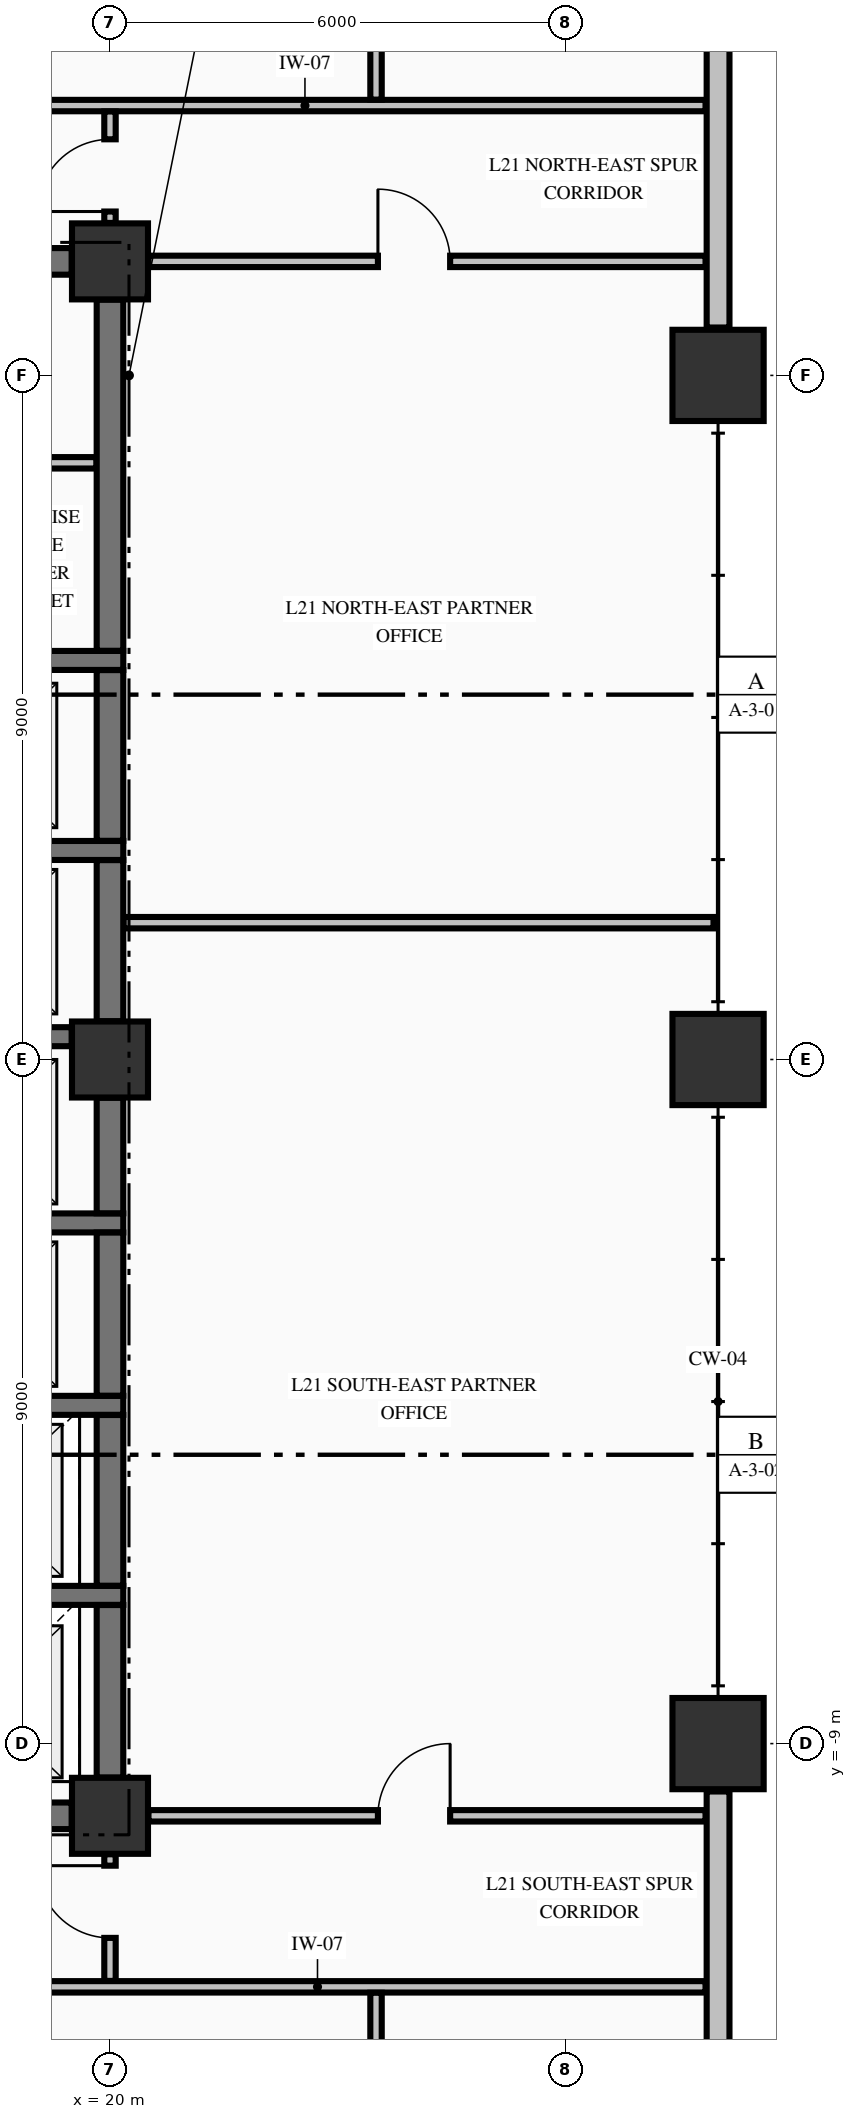
"""IFC4 building model, lengths in metres.
Left out: names, types, materials, properties, quantities, classifications, styles, units other than length and angle.
Written with IfcOpenShell. Run it as: python <this file> out.ifc"""

import sys

from ifc_helpers import new_model, si_unit, direction, frame, frame_2d, origin, origin_2d, place, context, subcontext, project, spatial, rectangle, extrude, element, fill, save


model = new_model("IFC4")
c1 = context("Model", 3, precision=1e-05, world=origin(), true_north=direction((0.0, 1.0)))
c2 = subcontext(c1, "Body", "Model", "MODEL_VIEW")
j1 = project(units=[si_unit("LENGTHUNIT", "METRE"), si_unit("PLANEANGLEUNIT", "RADIAN")], contexts=[c1])
p1 = place(None, origin())
s1 = spatial("IfcSite", under=j1, at=p1, CompositionType="ELEMENT")
p2 = place(p1, origin())
s2 = spatial("IfcBuilding", under=s1, at=p2, CompositionType="ELEMENT")
p3 = place(p2, frame((0.0, 0.0, 86.94)))
s3 = spatial("IfcBuildingStorey", under=s2, at=p3, CompositionType="ELEMENT", Elevation=86.94)
for number, where, z_axis, x_axis in (
    (1, (28.0, -9.0, -0.425), (0.0, 0.0, 1.0), (1.0, 0.0, 0.0)),
    (2, (28.0, 0.0, -0.425), (0.0, 0.0, 1.0), (1.0, 0.0, 0.0)),
    (3, (28.0, 9.0, -0.425), (0.0, 0.0, 1.0), (1.0, 0.0, 0.0)),
):
    element("IfcColumn", number, at=place(p3, frame(where, z_axis=z_axis, x_axis=x_axis)), inside=s3, PredefinedType="COLUMN", context=c2, shape_type="SweptSolid", body=[
        extrude(rectangle(XDim=1.2, YDim=1.2, at=origin_2d()), origin(), (0.0, 0.0, 1.0), 4.595),
    ])
for number, where, z_axis, x_axis in (
    (4, (20.0, -9.95, -0.425), (0.0, 0.0, 1.0), (1.0, 0.0, 0.0)),
    (5, (20.0, 10.5, -0.425), (0.0, 0.0, 1.0), (1.0, 0.0, 0.0)),
    (6, (20.0, 0.0, -0.425), (0.0, 0.0, 1.0), (1.0, 0.0, 0.0)),
):
    element("IfcColumn", number, at=place(p3, frame(where, z_axis=z_axis, x_axis=x_axis)), inside=s3, PredefinedType="COLUMN", context=c2, shape_type="SweptSolid", body=[
        extrude(rectangle(XDim=1.0, YDim=1.0, at=origin_2d()), origin(), (0.0, 0.0, 1.0), 4.595),
    ])
for number, where, z_axis, x_axis in (
    (7, (28.0, -20.37, 0.0), (0.0, 0.0, 1.0), (0.0, 1.0, 0.0)),
    (8, (28.0, 9.63, 0.0), (0.0, 0.0, 1.0), (0.0, 1.0, 0.0)),
):
    element("IfcWall", number, at=place(p3, frame(where, z_axis=z_axis, x_axis=x_axis)), inside=s3, PredefinedType="STANDARD", context=c2, shape_type="SweptSolid", body=[
        extrude(rectangle(XDim=10.74, YDim=0.3, at=frame_2d((5.37, 0.0))), origin(), (0.0, 0.0, 1.0), 1.962),
    ])
p4 = place(p3, frame((14.7, -9.95, 0.0), z_axis=(0.0, 0.0, 1.0), x_axis=(1.0, 0.0, 0.0)))
e9 = element("IfcWall", 9, at=p4, inside=s3, PredefinedType="SHEAR", context=c2, shape_type="SweptSolid", body=[
    extrude(rectangle(XDim=4.796, YDim=0.35, at=frame_2d((2.398, 0.0))), origin(), (0.0, 0.0, 1.0), 4.17),
])
p5 = place(p4, frame((0.65, 0.0, 0.0)))
e10 = element("IfcOpeningElement", 10, at=p5, cuts=e9, PredefinedType="OPENING", context=c2, shape_type="SweptSolid", body=[
    extrude(rectangle(XDim=1.2, YDim=2.15, at=frame_2d((0.6, 1.075))), frame((0.0, 0.185, 0.0), z_axis=(0.0, -1.0, 0.0), x_axis=(1.0, 0.0, 0.0)), (0.0, 0.0, 1.0), 0.37),
])
for number, where, z_axis, x_axis in (
    (11, (17.025, -7.05, 0.0), (0.0, 0.0, 1.0), (1.0, 0.0, 0.0)),
    (12, (17.025, -4.55, 0.0), (0.0, 0.0, 1.0), (1.0, 0.0, 0.0)),
    (13, (17.025, -2.15, 0.0), (0.0, 0.0, 1.0), (1.0, 0.0, 0.0)),
):
    element("IfcWall", number, at=place(p3, frame(where, z_axis=z_axis, x_axis=x_axis)), inside=s3, PredefinedType="SOLIDWALL", context=c2, shape_type="SweptSolid", body=[
        extrude(rectangle(XDim=3.15, YDim=0.25, at=frame_2d((1.575, 0.0))), origin(), (0.0, 0.0, 1.0), 4.17),
    ])
p6 = place(p3, frame((17.025, 0.3, 0.0), z_axis=(0.0, 0.0, 1.0), x_axis=(1.0, 0.0, 0.0)))
e14 = element("IfcWall", 14, at=p6, inside=s3, PredefinedType="SOLIDWALL", context=c2, shape_type="SweptSolid", body=[
    extrude(rectangle(XDim=2.471, YDim=0.25, at=frame_2d((1.236, 0.0))), origin(), (0.0, 0.0, 1.0), 4.17),
])
for number, where, z_axis, x_axis in (
    (15, (17.025, 2.75, 0.0), (0.0, 0.0, 1.0), (1.0, 0.0, 0.0)),
    (16, (17.025, 5.25, 0.0), (0.0, 0.0, 1.0), (1.0, 0.0, 0.0)),
):
    element("IfcWall", number, at=place(p3, frame(where, z_axis=z_axis, x_axis=x_axis)), inside=s3, PredefinedType="SOLIDWALL", context=c2, shape_type="SweptSolid", body=[
        extrude(rectangle(XDim=3.15, YDim=0.25, at=frame_2d((1.575, 0.0))), origin(), (0.0, 0.0, 1.0), 4.17),
    ])
p7 = place(p3, frame((14.7, 10.5, 0.0), z_axis=(0.0, 0.0, 1.0), x_axis=(1.0, 0.0, 0.0)))
e17 = element("IfcWall", 17, at=p7, inside=s3, PredefinedType="SHEAR", context=c2, shape_type="SweptSolid", body=[
    extrude(rectangle(XDim=4.796, YDim=0.35, at=frame_2d((2.398, 0.0))), origin(), (0.0, 0.0, 1.0), 4.17),
])
p8 = place(p7, frame((0.65, 0.0, 0.0)))
e18 = element("IfcOpeningElement", 18, at=p8, cuts=e17, PredefinedType="OPENING", context=c2, shape_type="SweptSolid", body=[
    extrude(rectangle(XDim=1.2, YDim=2.15, at=frame_2d((0.6, 1.075))), frame((0.0, 0.185, 0.0), z_axis=(0.0, -1.0, 0.0), x_axis=(1.0, 0.0, 0.0)), (0.0, 0.0, 1.0), 0.37),
])
p9 = place(p7, frame((3.225, 0.0, 0.0)))
e19 = element("IfcOpeningElement", 19, at=p9, cuts=e17, PredefinedType="OPENING", context=c2, shape_type="SweptSolid", body=[
    extrude(rectangle(XDim=0.95, YDim=2.15, at=frame_2d((0.475, 1.075))), frame((0.0, 0.185, 0.0), z_axis=(0.0, -1.0, 0.0), x_axis=(1.0, 0.0, 0.0)), (0.0, 0.0, 1.0), 0.37),
])
p10 = place(p3, frame((-22.835, -12.2, 0.0), z_axis=(0.0, 0.0, 1.0), x_axis=(1.0, 0.0, 0.0)))
e20 = element("IfcWall", 20, at=p10, inside=s3, PredefinedType="PARTITIONING", context=c2, shape_type="SweptSolid", body=[
    extrude(rectangle(XDim=50.67, YDim=0.15, at=frame_2d((25.335, 0.0))), origin(), (0.0, 0.0, 1.0), 4.17),
])
p11 = place(p10, frame((9.26, 0.0, 0.0)))
e21 = element("IfcOpeningElement", 21, at=p11, cuts=e20, PredefinedType="OPENING", context=c2, shape_type="SweptSolid", body=[
    extrude(rectangle(XDim=1.05, YDim=2.15, at=frame_2d((0.525, 1.075))), frame((0.0, 0.085, 0.0), z_axis=(0.0, -1.0, 0.0), x_axis=(1.0, 0.0, 0.0)), (0.0, 0.0, 1.0), 0.17),
])
p12 = place(p10, frame((19.31, 0.0, 0.0)))
e22 = element("IfcOpeningElement", 22, at=p12, cuts=e20, PredefinedType="OPENING", context=c2, shape_type="SweptSolid", body=[
    extrude(rectangle(XDim=1.05, YDim=2.15, at=frame_2d((0.525, 1.075))), frame((0.0, 0.085, 0.0), z_axis=(0.0, -1.0, 0.0), x_axis=(1.0, 0.0, 0.0)), (0.0, 0.0, 1.0), 0.17),
])
p13 = place(p10, frame((27.36, 0.0, 0.0)))
e23 = element("IfcOpeningElement", 23, at=p13, cuts=e20, PredefinedType="OPENING", context=c2, shape_type="SweptSolid", body=[
    extrude(rectangle(XDim=0.95, YDim=2.15, at=frame_2d((0.475, 1.075))), frame((0.0, 0.085, 0.0), z_axis=(0.0, -1.0, 0.0), x_axis=(1.0, 0.0, 0.0)), (0.0, 0.0, 1.0), 0.17),
])
p14 = place(p10, frame((32.41, 0.0, 0.0)))
e24 = element("IfcOpeningElement", 24, at=p14, cuts=e20, PredefinedType="OPENING", context=c2, shape_type="SweptSolid", body=[
    extrude(rectangle(XDim=0.95, YDim=2.15, at=frame_2d((0.475, 1.075))), frame((0.0, 0.085, 0.0), z_axis=(0.0, -1.0, 0.0), x_axis=(1.0, 0.0, 0.0)), (0.0, 0.0, 1.0), 0.17),
])
p15 = place(p10, frame((39.41, 0.0, 0.0)))
e25 = element("IfcOpeningElement", 25, at=p15, cuts=e20, PredefinedType="OPENING", context=c2, shape_type="SweptSolid", body=[
    extrude(rectangle(XDim=1.05, YDim=2.15, at=frame_2d((0.525, 1.075))), frame((0.0, 0.085, 0.0), z_axis=(0.0, -1.0, 0.0), x_axis=(1.0, 0.0, 0.0)), (0.0, 0.0, 1.0), 0.17),
])
p16 = place(p3, frame((20.506, -9.95, 0.0), z_axis=(0.0, 0.0, 1.0), x_axis=(1.0, 0.0, 0.0)))
e26 = element("IfcWall", 26, at=p16, inside=s3, PredefinedType="PARTITIONING", context=c2, shape_type="SweptSolid", body=[
    extrude(rectangle(XDim=7.329, YDim=0.15, at=frame_2d((3.665, 0.0))), origin(), (0.0, 0.0, 1.0), 4.17),
])
p17 = place(p16, frame((3.019, 0.0, 0.0)))
e27 = element("IfcOpeningElement", 27, at=p17, cuts=e26, PredefinedType="OPENING", context=c2, shape_type="SweptSolid", body=[
    extrude(rectangle(XDim=0.95, YDim=2.15, at=frame_2d((0.475, 1.075))), frame((0.0, 0.085, 0.0), z_axis=(0.0, -1.0, 0.0), x_axis=(1.0, 0.0, 0.0)), (0.0, 0.0, 1.0), 0.17),
])
p18 = place(p3, frame((20.178, 1.8, 0.0), z_axis=(0.0, 0.0, 1.0), x_axis=(1.0, 0.0, 0.0)))
e28 = element("IfcWall", 28, at=p18, inside=s3, PredefinedType="PARTITIONING", context=c2, shape_type="SweptSolid", body=[
    extrude(rectangle(XDim=7.762, YDim=0.15, at=frame_2d((3.881, 0.0))), origin(), (0.0, 0.0, 1.0), 4.17),
])
p19 = place(p3, frame((17.05, 7.85, 0.0), z_axis=(0.0, 0.0, 1.0), x_axis=(1.0, 0.0, 0.0)))
e29 = element("IfcWall", 29, at=p19, inside=s3, PredefinedType="PARTITIONING", context=c2, shape_type="SweptSolid", body=[
    extrude(rectangle(XDim=2.772, YDim=0.15, at=frame_2d((1.386, 0.0))), origin(), (0.0, 0.0, 1.0), 4.17),
])
p20 = place(p3, frame((20.506, 10.5, 0.0), z_axis=(0.0, 0.0, 1.0), x_axis=(1.0, 0.0, 0.0)))
e30 = element("IfcWall", 30, at=p20, inside=s3, PredefinedType="PARTITIONING", context=c2, shape_type="SweptSolid", body=[
    extrude(rectangle(XDim=7.329, YDim=0.15, at=frame_2d((3.665, 0.0))), origin(), (0.0, 0.0, 1.0), 4.17),
])
p21 = place(p20, frame((3.019, 0.0, 0.0)))
e31 = element("IfcOpeningElement", 31, at=p21, cuts=e30, PredefinedType="OPENING", context=c2, shape_type="SweptSolid", body=[
    extrude(rectangle(XDim=0.95, YDim=2.15, at=frame_2d((0.475, 1.075))), frame((0.0, 0.085, 0.0), z_axis=(0.0, -1.0, 0.0), x_axis=(1.0, 0.0, 0.0)), (0.0, 0.0, 1.0), 0.17),
])
p22 = place(p3, frame((-22.835, 12.55, 0.0), z_axis=(0.0, 0.0, 1.0), x_axis=(1.0, 0.0, 0.0)))
e32 = element("IfcWall", 32, at=p22, inside=s3, PredefinedType="PARTITIONING", context=c2, shape_type="SweptSolid", body=[
    extrude(rectangle(XDim=50.67, YDim=0.15, at=frame_2d((25.335, 0.0))), origin(), (0.0, 0.0, 1.0), 4.17),
])
p23 = place(p22, frame((8.93, 0.0, 0.0)))
e33 = element("IfcOpeningElement", 33, at=p23, cuts=e32, PredefinedType="OPENING", context=c2, shape_type="SweptSolid", body=[
    extrude(rectangle(XDim=1.05, YDim=2.15, at=frame_2d((0.525, 1.075))), frame((0.0, 0.085, 0.0), z_axis=(0.0, -1.0, 0.0), x_axis=(1.0, 0.0, 0.0)), (0.0, 0.0, 1.0), 0.17),
])
p24 = place(p22, frame((18.66, 0.0, 0.0)))
e34 = element("IfcOpeningElement", 34, at=p24, cuts=e32, PredefinedType="OPENING", context=c2, shape_type="SweptSolid", body=[
    extrude(rectangle(XDim=1.05, YDim=2.15, at=frame_2d((0.525, 1.075))), frame((0.0, 0.085, 0.0), z_axis=(0.0, -1.0, 0.0), x_axis=(1.0, 0.0, 0.0)), (0.0, 0.0, 1.0), 0.17),
])
p25 = place(p22, frame((26.71, 0.0, 0.0)))
e35 = element("IfcOpeningElement", 35, at=p25, cuts=e32, PredefinedType="OPENING", context=c2, shape_type="SweptSolid", body=[
    extrude(rectangle(XDim=0.95, YDim=2.15, at=frame_2d((0.475, 1.075))), frame((0.0, 0.085, 0.0), z_axis=(0.0, -1.0, 0.0), x_axis=(1.0, 0.0, 0.0)), (0.0, 0.0, 1.0), 0.17),
])
p26 = place(p22, frame((34.46, 0.0, 0.0)))
e36 = element("IfcOpeningElement", 36, at=p26, cuts=e32, PredefinedType="OPENING", context=c2, shape_type="SweptSolid", body=[
    extrude(rectangle(XDim=0.95, YDim=2.15, at=frame_2d((0.475, 1.075))), frame((0.0, 0.085, 0.0), z_axis=(0.0, -1.0, 0.0), x_axis=(1.0, 0.0, 0.0)), (0.0, 0.0, 1.0), 0.17),
])
p27 = place(p22, frame((39.08, 0.0, 0.0)))
e37 = element("IfcOpeningElement", 37, at=p27, cuts=e32, PredefinedType="OPENING", context=c2, shape_type="SweptSolid", body=[
    extrude(rectangle(XDim=1.05, YDim=2.15, at=frame_2d((0.525, 1.075))), frame((0.0, 0.085, 0.0), z_axis=(0.0, -1.0, 0.0), x_axis=(1.0, 0.0, 0.0)), (0.0, 0.0, 1.0), 0.17),
])
p28 = place(p3, frame((20.0, -9.446, 0.0), z_axis=(0.0, 0.0, 1.0), x_axis=(0.0, 1.0, 0.0)))
e38 = element("IfcWall", 38, at=p28, inside=s3, PredefinedType="SHEAR", context=c2, shape_type="SweptSolid", body=[
    extrude(rectangle(XDim=2.269, YDim=0.35, at=frame_2d((1.135, 0.0))), origin(), (0.0, 0.0, 1.0), 4.17),
])
p29 = place(p3, frame((20.0, -6.923, 0.0), z_axis=(0.0, 0.0, 1.0), x_axis=(0.0, 1.0, 0.0)))
e39 = element("IfcWall", 39, at=p29, inside=s3, PredefinedType="SHEAR", context=c2, shape_type="SweptSolid", body=[
    extrude(rectangle(XDim=2.246, YDim=0.35, at=frame_2d((1.123, 0.0))), origin(), (0.0, 0.0, 1.0), 4.17),
])
p30 = place(p3, frame((20.0, -4.423, 0.0), z_axis=(0.0, 0.0, 1.0), x_axis=(0.0, 1.0, 0.0)))
e40 = element("IfcWall", 40, at=p30, inside=s3, PredefinedType="SHEAR", context=c2, shape_type="SweptSolid", body=[
    extrude(rectangle(XDim=2.146, YDim=0.35, at=frame_2d((1.073, 0.0))), origin(), (0.0, 0.0, 1.0), 4.17),
])
p31 = place(p3, frame((20.0, -2.023, 0.0), z_axis=(0.0, 0.0, 1.0), x_axis=(0.0, 1.0, 0.0)))
e41 = element("IfcWall", 41, at=p31, inside=s3, PredefinedType="SHEAR", context=c2, shape_type="SweptSolid", body=[
    extrude(rectangle(XDim=1.519, YDim=0.35, at=frame_2d((0.76, 0.0))), origin(), (0.0, 0.0, 1.0), 4.17),
])
p32 = place(p3, frame((20.0, 0.504, 0.0), z_axis=(0.0, 0.0, 1.0), x_axis=(0.0, 1.0, 0.0)))
e42 = element("IfcWall", 42, at=p32, inside=s3, PredefinedType="SHEAR", context=c2, shape_type="SweptSolid", body=[
    extrude(rectangle(XDim=2.119, YDim=0.35, at=frame_2d((1.06, 0.0))), origin(), (0.0, 0.0, 1.0), 4.17),
])
p33 = place(p3, frame((20.0, 2.877, 0.0), z_axis=(0.0, 0.0, 1.0), x_axis=(0.0, 1.0, 0.0)))
e43 = element("IfcWall", 43, at=p33, inside=s3, PredefinedType="SHEAR", context=c2, shape_type="SweptSolid", body=[
    extrude(rectangle(XDim=2.246, YDim=0.35, at=frame_2d((1.123, 0.0))), origin(), (0.0, 0.0, 1.0), 4.17),
])
p34 = place(p3, frame((20.0, 5.377, 0.0), z_axis=(0.0, 0.0, 1.0), x_axis=(0.0, 1.0, 0.0)))
e44 = element("IfcWall", 44, at=p34, inside=s3, PredefinedType="SHEAR", context=c2, shape_type="SweptSolid", body=[
    extrude(rectangle(XDim=4.619, YDim=0.35, at=frame_2d((2.31, 0.0))), origin(), (0.0, 0.0, 1.0), 4.17),
])
p35 = place(p3, frame((20.0, -12.122, 0.0), z_axis=(0.0, 0.0, 1.0), x_axis=(0.0, 1.0, 0.0)))
e45 = element("IfcWall", 45, at=p35, inside=s3, PredefinedType="PARTITIONING", context=c2, shape_type="SweptSolid", body=[
    extrude(rectangle(XDim=1.666, YDim=0.15, at=frame_2d((0.833, 0.0))), origin(), (0.0, 0.0, 1.0), 3.36),
])
p36 = place(p35, frame((0.566, 0.0, 0.0)))
e46 = element("IfcOpeningElement", 46, at=p36, cuts=e45, PredefinedType="OPENING", context=c2, shape_type="SweptSolid", body=[
    extrude(rectangle(XDim=0.95, YDim=2.15, at=frame_2d((0.475, 1.075))), frame((0.0, 0.085, 0.0), z_axis=(0.0, -1.0, 0.0), x_axis=(1.0, 0.0, 0.0)), (0.0, 0.0, 1.0), 0.17),
])
p37 = place(p3, frame((20.0, 11.006, 0.0), z_axis=(0.0, 0.0, 1.0), x_axis=(0.0, 1.0, 0.0)))
e47 = element("IfcWall", 47, at=p37, inside=s3, PredefinedType="PARTITIONING", context=c2, shape_type="SweptSolid", body=[
    extrude(rectangle(XDim=1.466, YDim=0.15, at=frame_2d((0.733, 0.0))), origin(), (0.0, 0.0, 1.0), 3.36),
])
p38 = place(p37, frame((0.15, 0.0, 0.0)))
e48 = element("IfcOpeningElement", 48, at=p38, cuts=e47, PredefinedType="OPENING", context=c2, shape_type="SweptSolid", body=[
    extrude(rectangle(XDim=0.95, YDim=2.15, at=frame_2d((0.475, 1.075))), frame((0.0, 0.085, 0.0), z_axis=(0.0, -1.0, 0.0), x_axis=(1.0, 0.0, 0.0)), (0.0, 0.0, 1.0), 0.17),
])
p39 = place(p3, frame((23.5, -20.394, 0.0), z_axis=(0.0, 0.0, 1.0), x_axis=(0.0, 1.0, 0.0)))
e49 = element("IfcWall", 49, at=p39, inside=s3, PredefinedType="PARTITIONING", context=c2, shape_type="SweptSolid", body=[
    extrude(rectangle(XDim=8.116, YDim=0.15, at=frame_2d((4.058, 0.0))), origin(), (0.0, 0.0, 1.0), 4.17),
])
p40 = place(p3, frame((23.5, 12.628, 0.0), z_axis=(0.0, 0.0, 1.0), x_axis=(0.0, 1.0, 0.0)))
e50 = element("IfcWall", 50, at=p40, inside=s3, PredefinedType="PARTITIONING", context=c2, shape_type="SweptSolid", body=[
    extrude(rectangle(XDim=7.766, YDim=0.15, at=frame_2d((3.883, 0.0))), origin(), (0.0, 0.0, 1.0), 4.17),
])
p41 = place(p38, origin())
e51 = element("IfcDoor", 51, at=p41, inside=s3, OperationType="SINGLE_SWING_LEFT", PredefinedType="DOOR", context=c2, shape_type="SweptSolid", body=[
    extrude(rectangle(XDim=0.95, YDim=2.15, at=frame_2d((0.475, 1.075))), frame((0.0, 0.025, 0.0), z_axis=(0.0, -1.0, 0.0), x_axis=(1.0, 0.0, 0.0)), (0.0, 0.0, 1.0), 0.05),
])
fill(e48, e51)
p42 = place(p36, origin())
e52 = element("IfcDoor", 52, at=p42, inside=s3, OperationType="SINGLE_SWING_RIGHT", PredefinedType="DOOR", context=c2, shape_type="SweptSolid", body=[
    extrude(rectangle(XDim=0.95, YDim=2.15, at=frame_2d((0.475, 1.075))), frame((0.0, 0.025, 0.0), z_axis=(0.0, -1.0, 0.0), x_axis=(1.0, 0.0, 0.0)), (0.0, 0.0, 1.0), 0.05),
])
fill(e46, e52)
p43 = place(p21, origin())
e53 = element("IfcDoor", 53, at=p43, inside=s3, OperationType="SINGLE_SWING_LEFT", PredefinedType="DOOR", context=c2, shape_type="SweptSolid", body=[
    extrude(rectangle(XDim=0.95, YDim=2.15, at=frame_2d((0.475, 1.075))), frame((0.0, 0.025, 0.0), z_axis=(0.0, -1.0, 0.0), x_axis=(1.0, 0.0, 0.0)), (0.0, 0.0, 1.0), 0.05),
])
fill(e31, e53)
p44 = place(p17, origin())
e54 = element("IfcDoor", 54, at=p44, inside=s3, OperationType="SINGLE_SWING_RIGHT", PredefinedType="DOOR", context=c2, shape_type="SweptSolid", body=[
    extrude(rectangle(XDim=0.95, YDim=2.15, at=frame_2d((0.475, 1.075))), frame((0.0, 0.025, 0.0), z_axis=(0.0, -1.0, 0.0), x_axis=(1.0, 0.0, 0.0)), (0.0, 0.0, 1.0), 0.05),
])
fill(e27, e54)
save(model, sys.argv[1])
